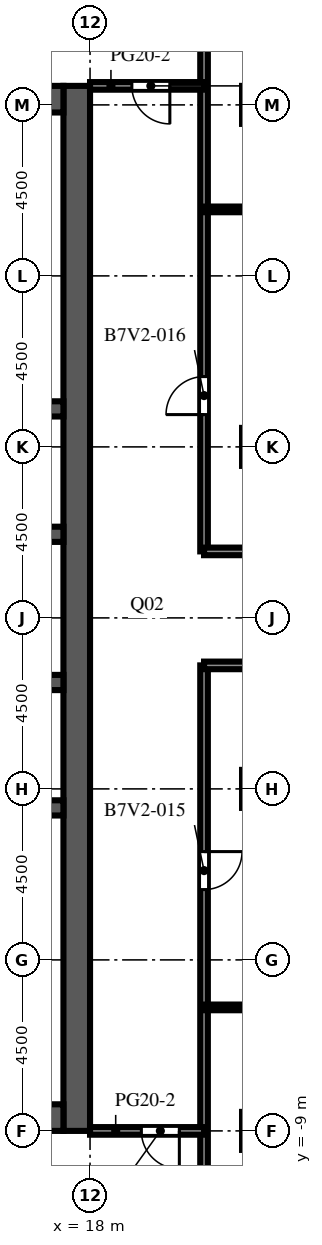
"""IFC4 building model, lengths in metres.
Left out: names, types, materials, properties, quantities, classifications, styles, units other than length and angle.
Written with IfcOpenShell. Run it as: python <this file> out.ifc"""

import sys

from ifc_helpers import new_model, si_unit, direction, frame, frame_2d, origin, place, context, subcontext, project, spatial, rectangle, extrude, element, fill, save


model = new_model("IFC4")
c1 = context("Model", 3, precision=1e-05, world=origin(), true_north=direction((0.0, 1.0)))
c2 = subcontext(c1, "Body", "Model", "MODEL_VIEW")
j1 = project(units=[si_unit("LENGTHUNIT", "METRE"), si_unit("PLANEANGLEUNIT", "RADIAN")], contexts=[c1])
p1 = place(None, origin())
s1 = spatial("IfcSite", under=j1, at=p1, CompositionType="ELEMENT")
p2 = place(p1, origin())
s2 = spatial("IfcBuilding", under=s1, at=p2, CompositionType="ELEMENT")
p3 = place(p2, frame((0.0, 0.0, 256.2)))
s3 = spatial("IfcBuildingStorey", under=s2, at=p3, CompositionType="ELEMENT", Elevation=256.2)
p4 = place(p3, frame((17.65, -9.0, 0.0), z_axis=(0.0, 0.0, 1.0), x_axis=(0.0, 1.0, 0.0)))
e1 = element("IfcWall", 1, at=p4, inside=s3, PredefinedType="SHEAR", context=c2, shape_type="SweptSolid", body=[
    extrude(rectangle(XDim=27.5, YDim=0.7, at=frame_2d((13.75, 0.0))), origin(), (0.0, 0.0, 1.0), 4.1),
])
p5 = place(p4, frame((12.55, 0.0, 0.0)))
e2 = element("IfcOpeningElement", 2, at=p5, cuts=e1, PredefinedType="OPENING", context=c2, shape_type="SweptSolid", body=[
    extrude(rectangle(XDim=2.4, YDim=2.4, at=frame_2d((1.2, 1.2))), frame((0.0, 0.36, 0.0), z_axis=(0.0, -1.0, 0.0), x_axis=(1.0, 0.0, 0.0)), (0.0, 0.0, 1.0), 0.72),
])
p6 = place(p4, frame((6.825, 0.0, 0.0)))
e3 = element("IfcOpeningElement", 3, at=p6, cuts=e1, PredefinedType="OPENING", context=c2, shape_type="SweptSolid", body=[
    extrude(rectangle(XDim=1.2, YDim=2.1, at=frame_2d((0.6, 1.05))), frame((0.0, 0.36, 0.0), z_axis=(0.0, -1.0, 0.0), x_axis=(1.0, 0.0, 0.0)), (0.0, 0.0, 1.0), 0.72),
])
p7 = place(p4, frame((19.475, 0.0, 0.0)))
e4 = element("IfcOpeningElement", 4, at=p7, cuts=e1, PredefinedType="OPENING", context=c2, shape_type="SweptSolid", body=[
    extrude(rectangle(XDim=1.2, YDim=2.1, at=frame_2d((0.6, 1.05))), frame((0.0, 0.36, 0.0), z_axis=(0.0, -1.0, 0.0), x_axis=(1.0, 0.0, 0.0)), (0.0, 0.0, 1.0), 0.72),
])
for number, where, z_axis, x_axis in (
    (5, (6.7, -8.65, 0.0), (0.0, 0.0, 1.0), (1.0, 0.0, 0.0)),
    (6, (6.7, 18.15, 0.0), (0.0, 0.0, 1.0), (1.0, 0.0, 0.0)),
):
    element("IfcWall", number, at=place(p3, frame(where, z_axis=z_axis, x_axis=x_axis)), inside=s3, PredefinedType="SHEAR", context=c2, shape_type="SweptSolid", body=[
        extrude(rectangle(XDim=10.6, YDim=0.7, at=frame_2d((5.3, 0.0))), origin(), (0.0, 0.0, 1.0), 4.1),
    ])
p8 = place(p3, frame((6.7, -0.5, 0.0), z_axis=(0.0, 0.0, 1.0), x_axis=(1.0, 0.0, 0.0)))
e7 = element("IfcWall", 7, at=p8, inside=s3, PredefinedType="SHEAR", context=c2, shape_type="SweptSolid", body=[
    extrude(rectangle(XDim=10.6, YDim=0.4, at=frame_2d((5.3, 0.0))), origin(), (0.0, 0.0, 1.0), 4.1),
])
p9 = place(p3, frame((6.7, 2.8, 0.0), z_axis=(0.0, 0.0, 1.0), x_axis=(1.0, 0.0, 0.0)))
e8 = element("IfcWall", 8, at=p9, inside=s3, PredefinedType="SHEAR", context=c2, shape_type="SweptSolid", body=[
    extrude(rectangle(XDim=10.6, YDim=0.4, at=frame_2d((5.3, 0.0))), origin(), (0.0, 0.0, 1.0), 4.1),
])
p10 = place(p9, frame((0.688, 0.0, 0.0)))
e9 = element("IfcOpeningElement", 9, at=p10, cuts=e8, PredefinedType="OPENING", context=c2, shape_type="SweptSolid", body=[
    extrude(rectangle(XDim=1.1, YDim=2.1, at=frame_2d((0.55, 1.05))), frame((0.0, 0.21, 0.0), z_axis=(0.0, -1.0, 0.0), x_axis=(1.0, 0.0, 0.0)), (0.0, 0.0, 1.0), 0.42),
])
p11 = place(p9, frame((3.438, 0.0, 0.0)))
e10 = element("IfcOpeningElement", 10, at=p11, cuts=e8, PredefinedType="OPENING", context=c2, shape_type="SweptSolid", body=[
    extrude(rectangle(XDim=1.1, YDim=2.1, at=frame_2d((0.55, 1.05))), frame((0.0, 0.21, 0.0), z_axis=(0.0, -1.0, 0.0), x_axis=(1.0, 0.0, 0.0)), (0.0, 0.0, 1.0), 0.42),
])
p12 = place(p9, frame((6.113, 0.0, 0.0)))
e11 = element("IfcOpeningElement", 11, at=p12, cuts=e8, PredefinedType="OPENING", context=c2, shape_type="SweptSolid", body=[
    extrude(rectangle(XDim=1.0, YDim=2.1, at=frame_2d((0.5, 1.05))), frame((0.0, 0.21, 0.0), z_axis=(0.0, -1.0, 0.0), x_axis=(1.0, 0.0, 0.0)), (0.0, 0.0, 1.0), 0.42),
])
p13 = place(p9, frame((8.863, 0.0, 0.0)))
e12 = element("IfcOpeningElement", 12, at=p13, cuts=e8, PredefinedType="OPENING", context=c2, shape_type="SweptSolid", body=[
    extrude(rectangle(XDim=1.0, YDim=2.1, at=frame_2d((0.5, 1.05))), frame((0.0, 0.21, 0.0), z_axis=(0.0, -1.0, 0.0), x_axis=(1.0, 0.0, 0.0)), (0.0, 0.0, 1.0), 0.42),
])
p14 = place(p3, frame((6.7, 6.7, 0.0), z_axis=(0.0, 0.0, 1.0), x_axis=(1.0, 0.0, 0.0)))
e13 = element("IfcWall", 13, at=p14, inside=s3, PredefinedType="SHEAR", context=c2, shape_type="SweptSolid", body=[
    extrude(rectangle(XDim=10.6, YDim=0.4, at=frame_2d((5.3, 0.0))), origin(), (0.0, 0.0, 1.0), 4.1),
])
p15 = place(p14, frame((3.438, 0.0, 0.0)))
e14 = element("IfcOpeningElement", 14, at=p15, cuts=e13, PredefinedType="OPENING", context=c2, shape_type="SweptSolid", body=[
    extrude(rectangle(XDim=1.1, YDim=2.1, at=frame_2d((0.55, 1.05))), frame((0.0, 0.21, 0.0), z_axis=(0.0, -1.0, 0.0), x_axis=(1.0, 0.0, 0.0)), (0.0, 0.0, 1.0), 0.42),
])
p16 = place(p14, frame((6.062, 0.0, 0.0)))
e15 = element("IfcOpeningElement", 15, at=p16, cuts=e13, PredefinedType="OPENING", context=c2, shape_type="SweptSolid", body=[
    extrude(rectangle(XDim=1.1, YDim=2.1, at=frame_2d((0.55, 1.05))), frame((0.0, 0.21, 0.0), z_axis=(0.0, -1.0, 0.0), x_axis=(1.0, 0.0, 0.0)), (0.0, 0.0, 1.0), 0.42),
])
p17 = place(p14, frame((8.812, 0.0, 0.0)))
e16 = element("IfcOpeningElement", 16, at=p17, cuts=e13, PredefinedType="OPENING", context=c2, shape_type="SweptSolid", body=[
    extrude(rectangle(XDim=1.1, YDim=2.1, at=frame_2d((0.55, 1.05))), frame((0.0, 0.21, 0.0), z_axis=(0.0, -1.0, 0.0), x_axis=(1.0, 0.0, 0.0)), (0.0, 0.0, 1.0), 0.42),
])
p18 = place(p14, frame((0.738, 0.0, 0.0)))
e17 = element("IfcOpeningElement", 17, at=p18, cuts=e13, PredefinedType="OPENING", context=c2, shape_type="SweptSolid", body=[
    extrude(rectangle(XDim=1.0, YDim=2.1, at=frame_2d((0.5, 1.05))), frame((0.0, 0.21, 0.0), z_axis=(0.0, -1.0, 0.0), x_axis=(1.0, 0.0, 0.0)), (0.0, 0.0, 1.0), 0.42),
])
p19 = place(p3, frame((6.7, 10.0, 0.0), z_axis=(0.0, 0.0, 1.0), x_axis=(1.0, 0.0, 0.0)))
e18 = element("IfcWall", 18, at=p19, inside=s3, PredefinedType="SHEAR", context=c2, shape_type="SweptSolid", body=[
    extrude(rectangle(XDim=10.6, YDim=0.4, at=frame_2d((5.3, 0.0))), origin(), (0.0, 0.0, 1.0), 4.1),
])
p20 = place(p3, frame((21.0, 3.25, 0.0), z_axis=(0.0, 0.0, 1.0), x_axis=(0.0, -1.0, 0.0)))
e19 = element("IfcWall", 19, at=p20, inside=s3, PredefinedType="PARTITIONING", context=c2, shape_type="SweptSolid", body=[
    extrude(rectangle(XDim=25.6, YDim=0.2, at=frame_2d((12.8, 0.0))), origin(), (0.0, 0.0, 1.0), 3.5),
])
p21 = place(p20, frame((4.9, 0.0, 0.0)))
e20 = element("IfcOpeningElement", 20, at=p21, cuts=e19, PredefinedType="OPENING", context=c2, shape_type="SweptSolid", body=[
    extrude(rectangle(XDim=1.0, YDim=2.1, at=frame_2d((0.5, 1.05))), frame((0.0, 0.11, 0.0), z_axis=(0.0, -1.0, 0.0), x_axis=(1.0, 0.0, 0.0)), (0.0, 0.0, 1.0), 0.22),
])
p22 = place(p3, frame((21.0, 31.35, 0.0), z_axis=(0.0, 0.0, 1.0), x_axis=(0.0, -1.0, 0.0)))
e21 = element("IfcWall", 21, at=p22, inside=s3, PredefinedType="PARTITIONING", context=c2, shape_type="SweptSolid", body=[
    extrude(rectangle(XDim=25.1, YDim=0.2, at=frame_2d((12.55, 0.0))), origin(), (0.0, 0.0, 1.0), 3.5),
])
p23 = place(p22, frame((20.5, 0.0, 0.0)))
e22 = element("IfcOpeningElement", 22, at=p23, cuts=e21, PredefinedType="OPENING", context=c2, shape_type="SweptSolid", body=[
    extrude(rectangle(XDim=1.0, YDim=2.1, at=frame_2d((0.5, 1.05))), frame((0.0, 0.11, 0.0), z_axis=(0.0, -1.0, 0.0), x_axis=(1.0, 0.0, 0.0)), (0.0, 0.0, 1.0), 0.22),
])
p24 = place(p3, frame((21.0, -9.0, 0.0), z_axis=(0.0, 0.0, 1.0), x_axis=(-1.0, 0.0, 0.0)))
e23 = element("IfcWall", 23, at=p24, inside=s3, PredefinedType="PARTITIONING", context=c2, shape_type="SweptSolid", body=[
    extrude(rectangle(XDim=3.0, YDim=0.2, at=frame_2d((1.5, 0.0))), origin(), (0.0, 0.0, 1.0), 3.5),
])
p25 = place(p24, frame((0.65, 0.0, 0.0)))
e24 = element("IfcOpeningElement", 24, at=p25, cuts=e23, PredefinedType="OPENING", context=c2, shape_type="SweptSolid", body=[
    extrude(rectangle(XDim=1.0, YDim=2.1, at=frame_2d((0.5, 1.05))), frame((0.0, 0.11, 0.0), z_axis=(0.0, -1.0, 0.0), x_axis=(1.0, 0.0, 0.0)), (0.0, 0.0, 1.0), 0.22),
])
p26 = place(p3, frame((26.85, -5.75, 0.0), z_axis=(0.0, 0.0, 1.0), x_axis=(-1.0, 0.0, 0.0)))
e25 = element("IfcWall", 25, at=p26, inside=s3, PredefinedType="PARTITIONING", context=c2, shape_type="SweptSolid", body=[
    extrude(rectangle(XDim=5.85, YDim=0.15, at=frame_2d((2.925, 0.0))), origin(), (0.0, 0.0, 1.0), 3.5),
])
p27 = place(p26, frame((2.0, 0.0, 0.0)))
e26 = element("IfcOpeningElement", 26, at=p27, cuts=e25, PredefinedType="OPENING", context=c2, shape_type="SweptSolid", body=[
    extrude(rectangle(XDim=1.0, YDim=2.1, at=frame_2d((0.5, 1.05))), frame((0.0, 0.085, 0.0), z_axis=(0.0, -1.0, 0.0), x_axis=(1.0, 0.0, 0.0)), (0.0, 0.0, 1.0), 0.17),
])
for number, where, z_axis, x_axis in (
    (27, (21.0, 3.25, 0.0), (0.0, 0.0, 1.0), (1.0, 0.0, 0.0)),
    (28, (21.0, 6.25, 0.0), (0.0, 0.0, 1.0), (1.0, 0.0, 0.0)),
):
    element("IfcWall", number, at=place(p3, frame(where, z_axis=z_axis, x_axis=x_axis)), inside=s3, PredefinedType="PARTITIONING", context=c2, shape_type="SweptSolid", body=[
        extrude(rectangle(XDim=5.85, YDim=0.2, at=frame_2d((2.925, 0.0))), origin(), (0.0, 0.0, 1.0), 3.5),
    ])
p28 = place(p3, frame((21.0, 15.25, 0.0), z_axis=(0.0, 0.0, 1.0), x_axis=(1.0, 0.0, 0.0)))
e29 = element("IfcWall", 29, at=p28, inside=s3, PredefinedType="PARTITIONING", context=c2, shape_type="SweptSolid", body=[
    extrude(rectangle(XDim=5.85, YDim=0.15, at=frame_2d((2.925, 0.0))), origin(), (0.0, 0.0, 1.0), 3.5),
])
p29 = place(p28, frame((2.35, 0.0, 0.0)))
e30 = element("IfcOpeningElement", 30, at=p29, cuts=e29, PredefinedType="OPENING", context=c2, shape_type="SweptSolid", body=[
    extrude(rectangle(XDim=1.0, YDim=2.1, at=frame_2d((0.5, 1.05))), frame((0.0, 0.085, 0.0), z_axis=(0.0, -1.0, 0.0), x_axis=(1.0, 0.0, 0.0)), (0.0, 0.0, 1.0), 0.17),
])
p30 = place(p3, frame((18.0, 18.5, 0.0), z_axis=(0.0, 0.0, 1.0), x_axis=(1.0, 0.0, 0.0)))
e31 = element("IfcWall", 31, at=p30, inside=s3, PredefinedType="PARTITIONING", context=c2, shape_type="SweptSolid", body=[
    extrude(rectangle(XDim=3.0, YDim=0.2, at=frame_2d((1.5, 0.0))), origin(), (0.0, 0.0, 1.0), 3.5),
])
p31 = place(p30, frame((1.1, 0.0, 0.0)))
e32 = element("IfcOpeningElement", 32, at=p31, cuts=e31, PredefinedType="OPENING", context=c2, shape_type="SweptSolid", body=[
    extrude(rectangle(XDim=1.0, YDim=2.1, at=frame_2d((0.5, 1.05))), frame((0.0, 0.11, 0.0), z_axis=(0.0, -1.0, 0.0), x_axis=(1.0, 0.0, 0.0)), (0.0, 0.0, 1.0), 0.22),
])
p32 = place(p5, origin())
e33 = element("IfcDoor", 33, at=p32, inside=s3, OperationType="DOUBLE_DOOR_DOUBLE_SWING", PredefinedType="DOOR", context=c2, shape_type="SweptSolid", body=[
    extrude(rectangle(XDim=2.4, YDim=2.4, at=frame_2d((1.2, 1.2))), frame((0.0, 0.025, 0.0), z_axis=(0.0, -1.0, 0.0), x_axis=(1.0, 0.0, 0.0)), (0.0, 0.0, 1.0), 0.05),
])
fill(e2, e33)
p33 = place(p6, frame((1.2, 0.0, 0.0), z_axis=(0.0, 0.0, 1.0), x_axis=(-1.0, 0.0, 0.0)))
e34 = element("IfcDoor", 34, at=p33, inside=s3, OperationType="SINGLE_SWING_LEFT", PredefinedType="DOOR", context=c2, shape_type="SweptSolid", body=[
    extrude(rectangle(XDim=1.2, YDim=2.1, at=frame_2d((0.6, 1.05))), frame((0.0, 0.025, 0.0), z_axis=(0.0, -1.0, 0.0), x_axis=(1.0, 0.0, 0.0)), (0.0, 0.0, 1.0), 0.05),
])
fill(e3, e34)
p34 = place(p7, frame((1.2, 0.0, 0.0), z_axis=(0.0, 0.0, 1.0), x_axis=(-1.0, 0.0, 0.0)))
e35 = element("IfcDoor", 35, at=p34, inside=s3, OperationType="SINGLE_SWING_LEFT", PredefinedType="DOOR", context=c2, shape_type="SweptSolid", body=[
    extrude(rectangle(XDim=1.2, YDim=2.1, at=frame_2d((0.6, 1.05))), frame((0.0, 0.025, 0.0), z_axis=(0.0, -1.0, 0.0), x_axis=(1.0, 0.0, 0.0)), (0.0, 0.0, 1.0), 0.05),
])
fill(e4, e35)
p35 = place(p25, origin())
e36 = element("IfcDoor", 36, at=p35, inside=s3, OperationType="SINGLE_SWING_LEFT", PredefinedType="DOOR", context=c2, shape_type="SweptSolid", body=[
    extrude(rectangle(XDim=1.0, YDim=2.1, at=frame_2d((0.5, 1.05))), frame((0.0, 0.025, 0.0), z_axis=(0.0, -1.0, 0.0), x_axis=(1.0, 0.0, 0.0)), (0.0, 0.0, 1.0), 0.05),
])
fill(e24, e36)
p36 = place(p31, origin())
e37 = element("IfcDoor", 37, at=p36, inside=s3, OperationType="SINGLE_SWING_RIGHT", PredefinedType="DOOR", context=c2, shape_type="SweptSolid", body=[
    extrude(rectangle(XDim=1.0, YDim=2.1, at=frame_2d((0.5, 1.05))), frame((0.0, 0.025, 0.0), z_axis=(0.0, -1.0, 0.0), x_axis=(1.0, 0.0, 0.0)), (0.0, 0.0, 1.0), 0.05),
])
fill(e32, e37)
p37 = place(p21, origin())
e38 = element("IfcDoor", 38, at=p37, inside=s3, OperationType="SINGLE_SWING_LEFT", PredefinedType="DOOR", context=c2, shape_type="SweptSolid", body=[
    extrude(rectangle(XDim=1.0, YDim=2.1, at=frame_2d((0.5, 1.05))), frame((0.0, 0.025, 0.0), z_axis=(0.0, -1.0, 0.0), x_axis=(1.0, 0.0, 0.0)), (0.0, 0.0, 1.0), 0.05),
])
fill(e20, e38)
p38 = place(p23, origin())
e39 = element("IfcDoor", 39, at=p38, inside=s3, OperationType="SINGLE_SWING_RIGHT", PredefinedType="DOOR", context=c2, shape_type="SweptSolid", body=[
    extrude(rectangle(XDim=1.0, YDim=2.1, at=frame_2d((0.5, 1.05))), frame((0.0, 0.025, 0.0), z_axis=(0.0, -1.0, 0.0), x_axis=(1.0, 0.0, 0.0)), (0.0, 0.0, 1.0), 0.05),
])
fill(e22, e39)
save(model, sys.argv[1])
